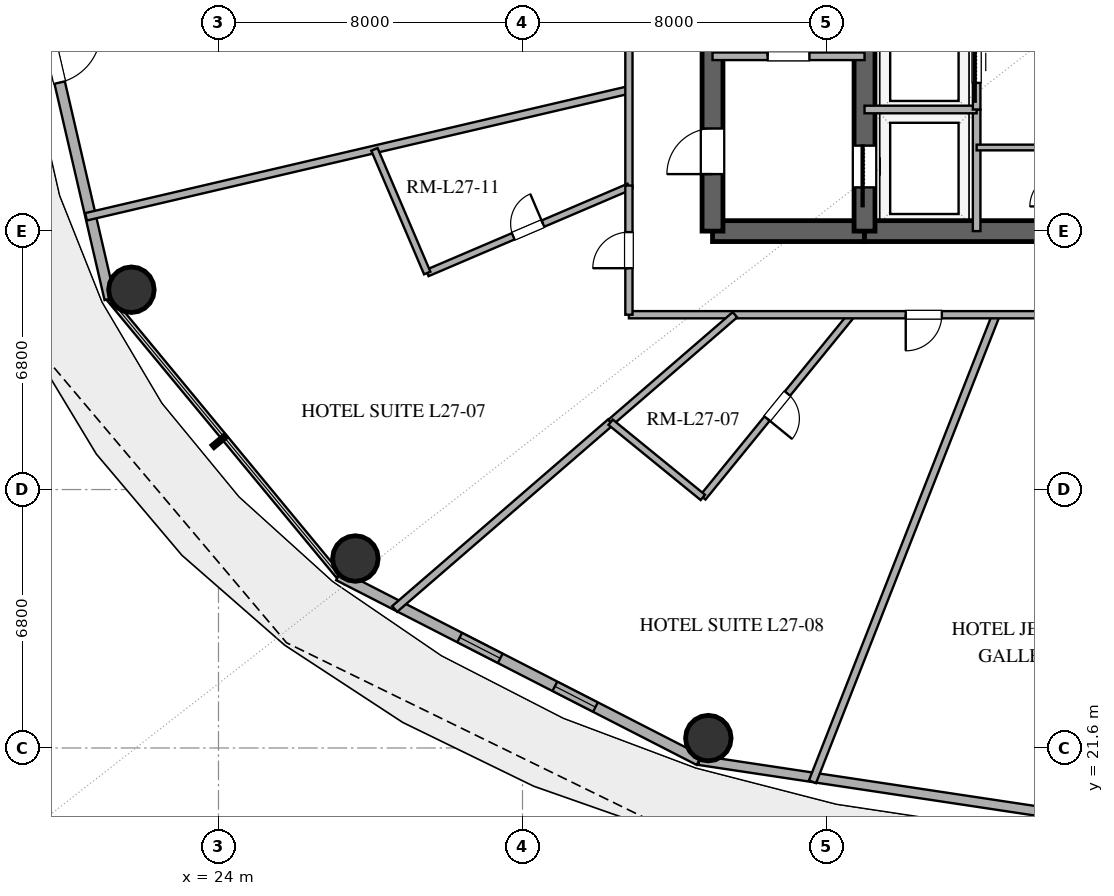
"""IFC4 building model, lengths in metres.
Left out: names, types, materials, properties, quantities, classifications, styles, units other than length and angle.
Written with IfcOpenShell. Run it as: python <this file> out.ifc"""

import sys

from ifc_helpers import new_model, si_unit, direction, frame, frame_2d, origin, origin_2d, place, context, subcontext, project, spatial, rectangle, hollow_circle, extrude, element, fill, save


model = new_model("IFC4")
c1 = context("Model", 3, precision=1e-05, world=origin(), true_north=direction((0.0, 1.0)))
c2 = subcontext(c1, "Body", "Model", "MODEL_VIEW")
j1 = project(units=[si_unit("LENGTHUNIT", "METRE"), si_unit("PLANEANGLEUNIT", "RADIAN")], contexts=[c1])
p1 = place(None, origin())
s1 = spatial("IfcSite", under=j1, at=p1, CompositionType="ELEMENT")
p2 = place(p1, origin())
s2 = spatial("IfcBuilding", under=s1, at=p2, CompositionType="ELEMENT")
p3 = place(p2, frame((0.0, 0.0, 109.2)))
s3 = spatial("IfcBuildingStorey", under=s2, at=p3, CompositionType="ELEMENT", Elevation=109.2)
p4 = place(p3, frame((37.0, 35.2, 0.0), z_axis=(0.0, 0.0, 1.0), x_axis=(1.0, 0.0, 0.0)))
e1 = element("IfcWall", 1, at=p4, inside=s3, PredefinedType="SHEAR", context=c2, shape_type="SweptSolid", body=[
    extrude(rectangle(XDim=4.0, YDim=0.55, at=frame_2d((2.0, 0.0))), origin(), (0.0, 0.0, 1.0), 3.38),
])
p5 = place(p3, frame((41.0, 35.2, 0.0), z_axis=(0.0, 0.0, 1.0), x_axis=(1.0, 0.0, 0.0)))
e2 = element("IfcWall", 2, at=p5, inside=s3, PredefinedType="SHEAR", context=c2, shape_type="SweptSolid", body=[
    extrude(rectangle(XDim=14.0, YDim=0.55, at=frame_2d((7.0, 0.0))), origin(), (0.0, 0.0, 1.0), 3.38),
])
p6 = place(p5, frame((6.1, 0.0, 0.0)))
e3 = element("IfcOpeningElement", 3, at=p6, cuts=e2, PredefinedType="OPENING", context=c2, shape_type="SweptSolid", body=[
    extrude(rectangle(XDim=1.8, YDim=2.25, at=frame_2d((0.9, 1.125))), frame((0.0, 0.285, 0.0), z_axis=(0.0, -1.0, 0.0), x_axis=(1.0, 0.0, 0.0)), (0.0, 0.0, 1.0), 0.57),
])
p7 = place(p3, frame((37.0, 35.2, 0.0), z_axis=(0.0, 0.0, 1.0), x_axis=(0.0, 1.0, 0.0)))
e4 = element("IfcWall", 4, at=p7, inside=s3, PredefinedType="SHEAR", context=c2, shape_type="SweptSolid", body=[
    extrude(rectangle(XDim=13.6, YDim=0.55, at=frame_2d((6.8, 0.0))), origin(), (0.0, 0.0, 1.0), 3.38),
])
p8 = place(p7, frame((1.5, 0.0, 0.0)))
e5 = element("IfcOpeningElement", 5, at=p8, cuts=e4, PredefinedType="OPENING", context=c2, shape_type="SweptSolid", body=[
    extrude(rectangle(XDim=1.2, YDim=2.15, at=frame_2d((0.6, 1.075))), frame((0.0, 0.285, 0.0), z_axis=(0.0, -1.0, 0.0), x_axis=(1.0, 0.0, 0.0)), (0.0, 0.0, 1.0), 0.57),
])
p9 = place(p3, frame((41.0, 35.2, 0.0), z_axis=(0.0, 0.0, 1.0), x_axis=(0.0, 1.0, 0.0)))
e6 = element("IfcWall", 6, at=p9, inside=s3, PredefinedType="SHEAR", context=c2, shape_type="SweptSolid", body=[
    extrude(rectangle(XDim=13.6, YDim=0.55, at=frame_2d((6.8, 0.0))), origin(), (0.0, 0.0, 1.0), 3.38),
])
p10 = place(p9, frame((1.15, 0.0, 0.0)))
e7 = element("IfcOpeningElement", 7, at=p10, cuts=e6, PredefinedType="OPENING", context=c2, shape_type="SweptSolid", body=[
    extrude(rectangle(XDim=1.1, YDim=2.2, at=frame_2d((0.55, 1.1))), frame((0.0, 0.285, 0.0), z_axis=(0.0, -1.0, 0.0), x_axis=(1.0, 0.0, 0.0)), (0.0, 0.0, 1.0), 0.57),
])
for number, where, z_axis, x_axis in (
    (8, (21.709, 33.657, 0.0), (0.0, 0.0, 1.0), (1.0, 0.0, 0.0)),
    (9, (27.602, 26.585, 0.0), (0.0, 0.0, 1.0), (1.0, 0.0, 0.0)),
    (10, (36.89, 21.859, 0.0), (0.0, 0.0, 1.0), (1.0, 0.0, 0.0)),
):
    element("IfcColumn", number, at=place(p3, frame(where, z_axis=z_axis, x_axis=x_axis)), inside=s3, PredefinedType="COLUMN", context=c2, shape_type="SweptSolid", body=[
        extrude(hollow_circle(Radius=0.6, WallThickness=0.032, at=origin_2d()), origin(), (0.0, 0.0, 1.0), 3.38),
    ])
p11 = place(p3, frame((19.151, 42.0, 0.0), z_axis=(0.0, 0.0, 1.0), x_axis=(0.22558597182, -0.974223264616, 0.0)))
e11 = element("IfcWall", 11, at=p11, inside=s3, PredefinedType="SOLIDWALL", context=c2, shape_type="SweptSolid", body=[
    extrude(rectangle(XDim=8.811, YDim=0.28, at=frame_2d((4.405, 0.0))), origin(), (0.0, 0.0, 1.0), 3.38),
])
p12 = place(p11, frame((1.568, 0.0, 0.0)))
e12 = element("IfcOpeningElement", 12, at=p12, cuts=e11, PredefinedType="OPENING", context=c2, shape_type="SweptSolid", body=[
    extrude(rectangle(XDim=1.4, YDim=2.2, at=frame_2d((0.7, 1.1))), frame((0.0, 0.15, 0.0), z_axis=(0.0, -1.0, 0.0), x_axis=(1.0, 0.0, 0.0)), (0.0, 0.0, 1.0), 0.3),
])
p13 = place(p3, frame((27.16, 26.14, 0.0), z_axis=(0.0, 0.0, 1.0), x_axis=(0.889959505023, -0.45603955905, 0.0)))
e13 = element("IfcWall", 13, at=p13, inside=s3, PredefinedType="SOLIDWALL", context=c2, shape_type="SweptSolid", body=[
    extrude(rectangle(XDim=10.662, YDim=0.28, at=frame_2d((5.331, 0.0))), origin(), (0.0, 0.0, 1.0), 3.38),
])
p14 = place(p13, frame((3.581, 0.0, 0.85)))
e14 = element("IfcOpeningElement", 14, at=p14, cuts=e13, PredefinedType="OPENING", context=c2, shape_type="SweptSolid", body=[
    extrude(rectangle(XDim=1.2, YDim=1.8, at=frame_2d((0.6, 0.9))), frame((0.0, 0.15, 0.0), z_axis=(0.0, -1.0, 0.0), x_axis=(1.0, 0.0, 0.0)), (0.0, 0.0, 1.0), 0.3),
])
p15 = place(p13, frame((6.396, 0.0, 0.85)))
e15 = element("IfcOpeningElement", 15, at=p15, cuts=e13, PredefinedType="OPENING", context=c2, shape_type="SweptSolid", body=[
    extrude(rectangle(XDim=1.2, YDim=1.8, at=frame_2d((0.6, 0.9))), frame((0.0, 0.15, 0.0), z_axis=(0.0, -1.0, 0.0), x_axis=(1.0, 0.0, 0.0)), (0.0, 0.0, 1.0), 0.3),
])
p16 = place(p3, frame((36.649, 21.277, 0.0), z_axis=(0.0, 0.0, 1.0), x_axis=(0.988877774656, -0.148730450117, 0.0)))
e16 = element("IfcWall", 16, at=p16, inside=s3, PredefinedType="SOLIDWALL", context=c2, shape_type="SweptSolid", body=[
    extrude(rectangle(XDim=11.479, YDim=0.25, at=frame_2d((5.74, 0.0))), origin(), (0.0, 0.0, 1.0), 3.38),
])
p17 = place(p3, frame((37.0, 39.8, 0.0), z_axis=(0.0, 0.0, 1.0), x_axis=(1.0, 0.0, 0.0)))
e17 = element("IfcWall", 17, at=p17, inside=s3, PredefinedType="SOLIDWALL", context=c2, shape_type="SweptSolid", body=[
    extrude(rectangle(XDim=4.0, YDim=0.2, at=frame_2d((2.0, 0.0))), origin(), (0.0, 0.0, 1.0), 2.74),
])
p18 = place(p17, frame((1.45, 0.0, 0.0)))
e18 = element("IfcOpeningElement", 18, at=p18, cuts=e17, PredefinedType="OPENING", context=c2, shape_type="SweptSolid", body=[
    extrude(rectangle(XDim=1.1, YDim=2.15, at=frame_2d((0.55, 1.075))), frame((0.0, 0.11, 0.0), z_axis=(0.0, -1.0, 0.0), x_axis=(1.0, 0.0, 0.0)), (0.0, 0.0, 1.0), 0.22),
])
p19 = place(p3, frame((43.95, 35.2, 0.0), z_axis=(0.0, 0.0, 1.0), x_axis=(0.0, 1.0, 0.0)))
e19 = element("IfcWall", 19, at=p19, inside=s3, PredefinedType="SOLIDWALL", context=c2, shape_type="SweptSolid", body=[
    extrude(rectangle(XDim=3.2, YDim=0.2, at=frame_2d((1.6, 0.0))), origin(), (0.0, 0.0, 1.0), 2.74),
])
p20 = place(p3, frame((41.0, 38.4, 0.0), z_axis=(0.0, 0.0, 1.0), x_axis=(1.0, 0.0, 0.0)))
e20 = element("IfcWall", 20, at=p20, inside=s3, PredefinedType="SOLIDWALL", context=c2, shape_type="SweptSolid", body=[
    extrude(rectangle(XDim=2.95, YDim=0.2, at=frame_2d((1.475, 0.0))), origin(), (0.0, 0.0, 1.0), 2.74),
])
p21 = place(p3, frame((43.95, 38.4, 0.0), z_axis=(0.0, 0.0, 1.0), x_axis=(0.0, 1.0, 0.0)))
e21 = element("IfcWall", 21, at=p21, inside=s3, PredefinedType="SOLIDWALL", context=c2, shape_type="SweptSolid", body=[
    extrude(rectangle(XDim=7.8, YDim=0.2, at=frame_2d((3.9, 0.0))), origin(), (0.0, 0.0, 1.0), 2.74),
])
p22 = place(p21, frame((0.7, 0.0, 0.0)))
e22 = element("IfcOpeningElement", 22, at=p22, cuts=e21, PredefinedType="OPENING", context=c2, shape_type="SweptSolid", body=[
    extrude(rectangle(XDim=1.1, YDim=2.2, at=frame_2d((0.55, 1.1))), frame((0.0, 0.11, 0.0), z_axis=(0.0, -1.0, 0.0), x_axis=(1.0, 0.0, 0.0)), (0.0, 0.0, 1.0), 0.22),
])
p23 = place(p21, frame((3.3, 0.0, 0.0)))
e23 = element("IfcOpeningElement", 23, at=p23, cuts=e21, PredefinedType="OPENING", context=c2, shape_type="SweptSolid", body=[
    extrude(rectangle(XDim=1.1, YDim=2.2, at=frame_2d((0.55, 1.1))), frame((0.0, 0.11, 0.0), z_axis=(0.0, -1.0, 0.0), x_axis=(1.0, 0.0, 0.0)), (0.0, 0.0, 1.0), 0.22),
])
p24 = place(p3, frame((43.95, 37.4, 0.0), z_axis=(0.0, 0.0, 1.0), x_axis=(1.0, 0.0, 0.0)))
e24 = element("IfcWall", 24, at=p24, inside=s3, PredefinedType="PARTITIONING", context=c2, shape_type="SweptSolid", body=[
    extrude(rectangle(XDim=2.25, YDim=0.15, at=frame_2d((1.125, 0.0))), origin(), (0.0, 0.0, 1.0), 2.74),
])
p25 = place(p3, frame((39.63, 20.711, 0.0), z_axis=(0.0, 0.0, 1.0), x_axis=(0.365888605627, 0.930658652929, 0.0)))
e25 = element("IfcWall", 25, at=p25, inside=s3, PredefinedType="PARTITIONING", context=c2, shape_type="SweptSolid", body=[
    extrude(rectangle(XDim=13.205, YDim=0.2, at=frame_2d((6.603, 0.0))), origin(), (0.0, 0.0, 1.0), 2.74),
])
p26 = place(p3, frame((34.8, 38.915, 0.0), z_axis=(0.0, 0.0, 1.0), x_axis=(-0.973762218061, -0.227567885864, 0.0)))
e26 = element("IfcWall", 26, at=p26, inside=s3, PredefinedType="PARTITIONING", context=c2, shape_type="SweptSolid", body=[
    extrude(rectangle(XDim=14.67, YDim=0.2, at=frame_2d((7.335, 0.0))), origin(), (0.0, 0.0, 1.0), 2.74),
])
p27 = place(p3, frame((28.636, 25.258, 0.0), z_axis=(0.0, 0.0, 1.0), x_axis=(0.756485284597, 0.654010714124, 0.0)))
e27 = element("IfcWall", 27, at=p27, inside=s3, PredefinedType="PARTITIONING", context=c2, shape_type="SweptSolid", body=[
    extrude(rectangle(XDim=7.512, YDim=0.2, at=frame_2d((3.756, 0.0))), origin(), (0.0, 0.0, 1.0), 2.74),
])
p28 = place(p3, frame((34.8, 36.329, 0.0), z_axis=(0.0, 0.0, 1.0), x_axis=(0.0, 1.0, 0.0)))
e28 = element("IfcWall", 28, at=p28, inside=s3, PredefinedType="PARTITIONING", context=c2, shape_type="SweptSolid", body=[
    extrude(rectangle(XDim=14.671, YDim=0.19, at=frame_2d((7.336, 0.0))), origin(), (0.0, 0.0, 1.0), 2.74),
])
p29 = place(p28, frame((5.341, 0.0, 0.0)))
e29 = element("IfcOpeningElement", 29, at=p29, cuts=e28, PredefinedType="OPENING", context=c2, shape_type="SweptSolid", body=[
    extrude(rectangle(XDim=1.0, YDim=2.2, at=frame_2d((0.5, 1.1))), frame((0.0, 0.105, 0.0), z_axis=(0.0, -1.0, 0.0), x_axis=(1.0, 0.0, 0.0)), (0.0, 0.0, 1.0), 0.21),
])
p30 = place(p28, frame((11.076, 0.0, 0.0)))
e30 = element("IfcOpeningElement", 30, at=p30, cuts=e28, PredefinedType="OPENING", context=c2, shape_type="SweptSolid", body=[
    extrude(rectangle(XDim=0.95, YDim=2.15, at=frame_2d((0.475, 1.075))), frame((0.0, 0.105, 0.0), z_axis=(0.0, -1.0, 0.0), x_axis=(1.0, 0.0, 0.0)), (0.0, 0.0, 1.0), 0.21),
])
p31 = place(p3, frame((40.664, 33.0, 0.0), z_axis=(0.0, 0.0, 1.0), x_axis=(-0.631841179317, -0.775097880347, 0.0)))
e31 = element("IfcWall", 31, at=p31, inside=s3, PredefinedType="PLUMBINGWALL", context=c2, shape_type="SweptSolid", body=[
    extrude(rectangle(XDim=6.202, YDim=0.18, at=frame_2d((3.101, 0.0))), origin(), (0.0, 0.0, 1.0), 2.74),
])
p32 = place(p31, frame((2.676, 0.0, 0.0)))
e32 = element("IfcOpeningElement", 32, at=p32, cuts=e31, PredefinedType="OPENING", context=c2, shape_type="SweptSolid", body=[
    extrude(rectangle(XDim=0.85, YDim=2.1, at=frame_2d((0.425, 1.05))), frame((0.0, 0.1, 0.0), z_axis=(0.0, -1.0, 0.0), x_axis=(1.0, 0.0, 0.0)), (0.0, 0.0, 1.0), 0.2),
])
p33 = place(p3, frame((29.493, 34.097, 0.0), z_axis=(0.0, 0.0, 1.0), x_axis=(0.919684682014, 0.392657720755, 0.0)))
e33 = element("IfcWall", 33, at=p33, inside=s3, PredefinedType="PLUMBINGWALL", context=c2, shape_type="SweptSolid", body=[
    extrude(rectangle(XDim=5.771, YDim=0.18, at=frame_2d((2.885, 0.0))), origin(), (0.0, 0.0, 1.0), 2.74),
])
p34 = place(p33, frame((2.46, 0.0, 0.0)))
e34 = element("IfcOpeningElement", 34, at=p34, cuts=e33, PredefinedType="OPENING", context=c2, shape_type="SweptSolid", body=[
    extrude(rectangle(XDim=0.85, YDim=2.1, at=frame_2d((0.425, 1.05))), frame((0.0, 0.1, 0.0), z_axis=(0.0, -1.0, 0.0), x_axis=(1.0, 0.0, 0.0)), (0.0, 0.0, 1.0), 0.2),
])
p35 = place(p3, frame((50.648, 33.0, 0.0), z_axis=(0.0, 0.0, 1.0), x_axis=(-1.0, 0.0, 0.0)))
e35 = element("IfcWall", 35, at=p35, inside=s3, PredefinedType="PARTITIONING", context=c2, shape_type="SweptSolid", body=[
    extrude(rectangle(XDim=15.848, YDim=0.19, at=frame_2d((7.924, 0.0))), origin(), (0.0, 0.0, 1.0), 2.74),
])
p36 = place(p35, frame((3.427, 0.0, 0.0)))
e36 = element("IfcOpeningElement", 36, at=p36, cuts=e35, PredefinedType="OPENING", context=c2, shape_type="SweptSolid", body=[
    extrude(rectangle(XDim=1.0, YDim=2.2, at=frame_2d((0.5, 1.1))), frame((0.0, 0.105, 0.0), z_axis=(0.0, -1.0, 0.0), x_axis=(1.0, 0.0, 0.0)), (0.0, 0.0, 1.0), 0.21),
])
p37 = place(p35, frame((7.614, 0.0, 0.0)))
e37 = element("IfcOpeningElement", 37, at=p37, cuts=e35, PredefinedType="OPENING", context=c2, shape_type="SweptSolid", body=[
    extrude(rectangle(XDim=0.95, YDim=2.15, at=frame_2d((0.475, 1.075))), frame((0.0, 0.105, 0.0), z_axis=(0.0, -1.0, 0.0), x_axis=(1.0, 0.0, 0.0)), (0.0, 0.0, 1.0), 0.21),
])
p38 = place(p3, frame((34.319, 30.171, 0.0), z_axis=(0.0, 0.0, 1.0), x_axis=(0.756448461864, 0.654053304053, 0.0)))
e38 = element("IfcWall", 38, at=p38, inside=s3, PredefinedType="PLUMBINGWALL", context=c2, shape_type="SweptSolid", body=[
    extrude(rectangle(XDim=4.325, YDim=0.18, at=frame_2d((2.163, 0.0))), origin(), (0.0, 0.0, 1.0), 2.74),
])
p39 = place(p3, frame((28.104, 37.35, 0.0), z_axis=(0.0, 0.0, 1.0), x_axis=(0.392677696951, -0.919676152957, 0.0)))
e39 = element("IfcWall", 39, at=p39, inside=s3, PredefinedType="PLUMBINGWALL", context=c2, shape_type="SweptSolid", body=[
    extrude(rectangle(XDim=3.537, YDim=0.18, at=frame_2d((1.769, 0.0))), origin(), (0.0, 0.0, 1.0), 2.74),
])
p40 = place(p3, frame((34.8, 33.0, 0.0), z_axis=(0.0, 0.0, 1.0), x_axis=(0.0, 1.0, 0.0)))
e40 = element("IfcWall", 40, at=p40, inside=s3, PredefinedType="PARTITIONING", context=c2, shape_type="SweptSolid", body=[
    extrude(rectangle(XDim=3.398, YDim=0.19, at=frame_2d((1.699, 0.0))), origin(), (0.0, 0.0, 1.0), 2.74),
])
p41 = place(p40, frame((1.224, 0.0, 0.0)))
e41 = element("IfcOpeningElement", 41, at=p41, cuts=e40, PredefinedType="OPENING", context=c2, shape_type="SweptSolid", body=[
    extrude(rectangle(XDim=0.95, YDim=2.15, at=frame_2d((0.475, 1.075))), frame((0.0, 0.105, 0.0), z_axis=(0.0, -1.0, 0.0), x_axis=(1.0, 0.0, 0.0)), (0.0, 0.0, 1.0), 0.21),
])
p42 = place(p3, frame((36.745, 28.193, 0.0), z_axis=(0.0, 0.0, 1.0), x_axis=(-0.775130314585, 0.631801389212, 0.0)))
e42 = element("IfcWall", 42, at=p42, inside=s3, PredefinedType="PLUMBINGWALL", context=c2, shape_type="SweptSolid", body=[
    extrude(rectangle(XDim=3.131, YDim=0.18, at=frame_2d((1.565, 0.0))), origin(), (0.0, 0.0, 1.0), 2.74),
])
p43 = place(p12, origin())
e43 = element("IfcDoor", 43, at=p43, inside=s3, OperationType="SINGLE_SWING_LEFT", PredefinedType="DOOR", context=c2, shape_type="SweptSolid", body=[
    extrude(rectangle(XDim=1.4, YDim=2.2, at=frame_2d((0.7, 1.1))), frame((0.0, 0.025, 0.0), z_axis=(0.0, -1.0, 0.0), x_axis=(1.0, 0.0, 0.0)), (0.0, 0.0, 1.0), 0.05),
])
fill(e12, e43)
p44 = place(p14, origin())
e44 = element("IfcWindow", 44, at=p44, inside=s3, PartitioningType="SINGLE_PANEL", PredefinedType="WINDOW", context=c2, shape_type="SweptSolid", body=[
    extrude(rectangle(XDim=1.2, YDim=1.8, at=frame_2d((0.6, 0.9))), frame((0.0, 0.03, 0.0), z_axis=(0.0, -1.0, 0.0), x_axis=(1.0, 0.0, 0.0)), (0.0, 0.0, 1.0), 0.06),
])
fill(e14, e44)
p45 = place(p15, origin())
e45 = element("IfcWindow", 45, at=p45, inside=s3, PartitioningType="SINGLE_PANEL", PredefinedType="WINDOW", context=c2, shape_type="SweptSolid", body=[
    extrude(rectangle(XDim=1.2, YDim=1.8, at=frame_2d((0.6, 0.9))), frame((0.0, 0.03, 0.0), z_axis=(0.0, -1.0, 0.0), x_axis=(1.0, 0.0, 0.0)), (0.0, 0.0, 1.0), 0.06),
])
fill(e15, e45)
p46 = place(p10, origin())
e46 = element("IfcDoor", 46, at=p46, inside=s3, OperationType="SLIDING_TO_LEFT", PredefinedType="DOOR", context=c2, shape_type="SweptSolid", body=[
    extrude(rectangle(XDim=1.1, YDim=2.2, at=frame_2d((0.55, 1.1))), frame((0.0, 0.025, 0.0), z_axis=(0.0, -1.0, 0.0), x_axis=(1.0, 0.0, 0.0)), (0.0, 0.0, 1.0), 0.05),
])
fill(e7, e46)
p47 = place(p8, origin())
e47 = element("IfcDoor", 47, at=p47, inside=s3, OperationType="SINGLE_SWING_LEFT", PredefinedType="DOOR", context=c2, shape_type="SweptSolid", body=[
    extrude(rectangle(XDim=1.2, YDim=2.15, at=frame_2d((0.6, 1.075))), frame((0.0, 0.025, 0.0), z_axis=(0.0, -1.0, 0.0), x_axis=(1.0, 0.0, 0.0)), (0.0, 0.0, 1.0), 0.05),
])
fill(e5, e47)
p48 = place(p18, origin())
e48 = element("IfcDoor", 48, at=p48, inside=s3, OperationType="SINGLE_SWING_LEFT", PredefinedType="DOOR", context=c2, shape_type="SweptSolid", body=[
    extrude(rectangle(XDim=1.1, YDim=2.15, at=frame_2d((0.55, 1.075))), frame((0.0, 0.025, 0.0), z_axis=(0.0, -1.0, 0.0), x_axis=(1.0, 0.0, 0.0)), (0.0, 0.0, 1.0), 0.05),
])
fill(e18, e48)
p49 = place(p22, origin())
e49 = element("IfcDoor", 49, at=p49, inside=s3, OperationType="SLIDING_TO_LEFT", PredefinedType="DOOR", context=c2, shape_type="SweptSolid", body=[
    extrude(rectangle(XDim=1.1, YDim=2.2, at=frame_2d((0.55, 1.1))), frame((0.0, 0.025, 0.0), z_axis=(0.0, -1.0, 0.0), x_axis=(1.0, 0.0, 0.0)), (0.0, 0.0, 1.0), 0.05),
])
fill(e22, e49)
p50 = place(p32, origin())
e50 = element("IfcDoor", 50, at=p50, inside=s3, OperationType="SINGLE_SWING_RIGHT", PredefinedType="DOOR", context=c2, shape_type="SweptSolid", body=[
    extrude(rectangle(XDim=0.85, YDim=2.1, at=frame_2d((0.425, 1.05))), frame((0.0, 0.025, 0.0), z_axis=(0.0, -1.0, 0.0), x_axis=(1.0, 0.0, 0.0)), (0.0, 0.0, 1.0), 0.05),
])
fill(e32, e50)
p51 = place(p34, origin())
e51 = element("IfcDoor", 51, at=p51, inside=s3, OperationType="SINGLE_SWING_RIGHT", PredefinedType="DOOR", context=c2, shape_type="SweptSolid", body=[
    extrude(rectangle(XDim=0.85, YDim=2.1, at=frame_2d((0.425, 1.05))), frame((0.0, 0.025, 0.0), z_axis=(0.0, -1.0, 0.0), x_axis=(1.0, 0.0, 0.0)), (0.0, 0.0, 1.0), 0.05),
])
fill(e34, e51)
p52 = place(p37, origin())
e52 = element("IfcDoor", 52, at=p52, inside=s3, OperationType="SINGLE_SWING_RIGHT", PredefinedType="DOOR", context=c2, shape_type="SweptSolid", body=[
    extrude(rectangle(XDim=0.95, YDim=2.15, at=frame_2d((0.475, 1.075))), frame((0.0, 0.025, 0.0), z_axis=(0.0, -1.0, 0.0), x_axis=(1.0, 0.0, 0.0)), (0.0, 0.0, 1.0), 0.05),
])
fill(e37, e52)
p53 = place(p41, origin())
e53 = element("IfcDoor", 53, at=p53, inside=s3, OperationType="SINGLE_SWING_LEFT", PredefinedType="DOOR", context=c2, shape_type="SweptSolid", body=[
    extrude(rectangle(XDim=0.95, YDim=2.15, at=frame_2d((0.475, 1.075))), frame((0.0, 0.025, 0.0), z_axis=(0.0, -1.0, 0.0), x_axis=(1.0, 0.0, 0.0)), (0.0, 0.0, 1.0), 0.05),
])
fill(e41, e53)
save(model, sys.argv[1])
